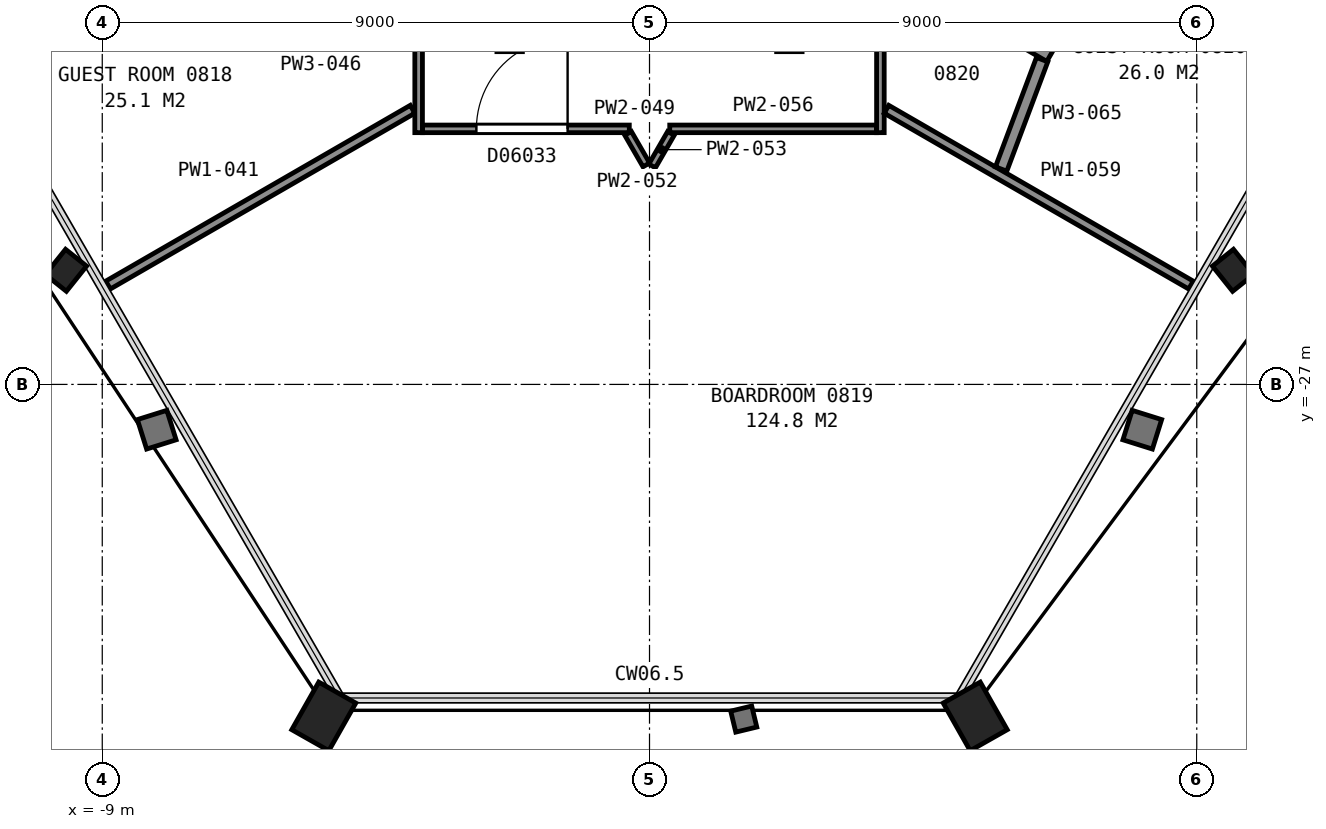
"""IFC4 building model, lengths in metres.
Left out: names, types, materials, properties, quantities, classifications, styles, units other than length and angle.
Written with IfcOpenShell. Run it as: python <this file> out.ifc"""

import sys

from ifc_helpers import new_model, si_unit, direction, frame, frame_2d, origin, origin_2d, place, context, subcontext, project, spatial, rectangle, hollow_rectangle, i_section, extrude, element, fill, save


model = new_model("IFC4")
c1 = context("Model", 3, precision=1e-05, world=origin(), true_north=direction((0.0, 1.0)))
c2 = subcontext(c1, "Body", "Model", "MODEL_VIEW")
j1 = project(units=[si_unit("LENGTHUNIT", "METRE"), si_unit("PLANEANGLEUNIT", "RADIAN")], contexts=[c1])
p1 = place(None, origin())
s1 = spatial("IfcSite", under=j1, at=p1, CompositionType="ELEMENT")
p2 = place(p1, origin())
s2 = spatial("IfcBuilding", under=s1, at=p2, CompositionType="ELEMENT")
p3 = place(p2, frame((0.0, 0.0, 44.0)))
s3 = spatial("IfcBuildingStorey", under=s2, at=p3, CompositionType="ELEMENT", Elevation=44.0)
p4 = place(p3, frame((-9.531, -25.042, 0.025), z_axis=(-0.055280193141, -0.0691858675, 0.99607098943), x_axis=(-0.500260579817, 0.865270863032, 0.032337066484)))
e1 = element("IfcColumn", 1, at=p4, inside=s3, PredefinedType="COLUMN", context=c2, shape_type="SweptSolid", body=[
    extrude(i_section(OverallWidth=0.442, OverallDepth=0.531, WebThickness=0.066, FlangeThickness=0.106, FilletRadius=0.015, at=origin_2d()), origin(), (0.0, 0.0, 1.0), 3.564),
])
for number, where, z_axis, x_axis in (
    (2, (-5.302, -32.363, 0.04), (-0.047, -0.083, 0.995), (-0.999, -0.001, -0.047)),
    (3, (5.302, -32.363, 0.04), (0.047, -0.083, 0.995), (-0.999, 0.001, 0.047)),
):
    element("IfcColumn", number, at=place(p3, frame(where, z_axis=z_axis, x_axis=x_axis)), inside=s3, PredefinedType="COLUMN", context=c2, shape_type="SweptSolid", body=[
        extrude(hollow_rectangle(XDim=0.7, YDim=0.9, WallThickness=0.065, at=origin_2d()), origin(), (0.0, 0.0, 1.0), 3.536),
    ])
p5 = place(p3, frame((9.531, -25.042, 0.025), z_axis=(0.055280193141, -0.0691858675, 0.99607098943), x_axis=(-0.500260579817, -0.865270863032, -0.032337066484)))
e4 = element("IfcColumn", 4, at=p5, inside=s3, PredefinedType="COLUMN", context=c2, shape_type="SweptSolid", body=[
    extrude(i_section(OverallWidth=0.442, OverallDepth=0.531, WebThickness=0.066, FlangeThickness=0.106, FilletRadius=0.015, at=origin_2d()), origin(), (0.0, 0.0, 1.0), 3.564),
])
p6 = place(p3, frame((-8.905, -25.366, 0.0), z_axis=(0.0, 0.0, 1.0), x_axis=(0.866025977343, 0.499999006567, 0.0)))
e5 = element("IfcWall", 5, at=p6, inside=s3, PredefinedType="PARTITIONING", context=c2, shape_type="SweptSolid", body=[
    extrude(rectangle(XDim=5.782, YDim=0.15, at=frame_2d((2.891, 0.0))), origin(), (0.0, 0.0, 1.0), 2.613),
])
p7 = place(p3, frame((-3.797, -22.86, 0.0), z_axis=(0.0, 0.0, 1.0), x_axis=(0.0, 1.0, 0.0)))
e6 = element("IfcWall", 6, at=p7, inside=s3, PredefinedType="PARTITIONING", context=c2, shape_type="SweptSolid", body=[
    extrude(rectangle(XDim=5.871, YDim=0.125, at=frame_2d((2.935, 0.0))), origin(), (0.0, 0.0, 1.0), 2.613),
])
p8 = place(p7, frame((1.442, 0.0, 0.0)))
e7 = element("IfcOpeningElement", 7, at=p8, cuts=e6, PredefinedType="OPENING", context=c2, shape_type="SweptSolid", body=[
    extrude(rectangle(XDim=0.9, YDim=2.1, at=frame_2d((0.45, 1.05))), frame((0.0, 0.073, 0.0), z_axis=(0.0, -1.0, 0.0), x_axis=(1.0, 0.0, 0.0)), (0.0, 0.0, 1.0), 0.145),
])
p9 = place(p3, frame((-0.333, -22.797, 0.0), z_axis=(0.0, 0.0, 1.0), x_axis=(-1.0, 0.0, 0.0)))
e8 = element("IfcWall", 8, at=p9, inside=s3, PredefinedType="PARTITIONING", context=c2, shape_type="SweptSolid", body=[
    extrude(rectangle(XDim=3.399, YDim=0.125, at=frame_2d((1.7, 0.0))), origin(), (0.0, 0.0, 1.0), 2.613),
])
p10 = place(p9, frame((1.014, 0.0, 0.0)))
e9 = element("IfcOpeningElement", 9, at=p10, cuts=e8, PredefinedType="OPENING", context=c2, shape_type="SweptSolid", body=[
    extrude(rectangle(XDim=1.5, YDim=2.1, at=frame_2d((0.75, 1.05))), frame((0.0, 0.073, 0.0), z_axis=(0.0, -1.0, 0.0), x_axis=(1.0, 0.0, 0.0)), (0.0, 0.0, 1.0), 0.145),
])
p11 = place(p3, frame((-0.353, -22.871, 0.0), z_axis=(0.0, 0.0, 1.0), x_axis=(0.499863517517, -0.866104187645, 0.0)))
e10 = element("IfcWall", 10, at=p11, inside=s3, PredefinedType="PARTITIONING", context=c2, shape_type="SweptSolid", body=[
    extrude(rectangle(XDim=0.599, YDim=0.125, at=frame_2d((0.3, 0.0))), origin(), (0.0, 0.0, 1.0), 2.613),
])
p12 = place(p3, frame((0.043, -23.407, 0.0), z_axis=(0.0, 0.0, 1.0), x_axis=(0.499870333213, 0.866100253997, 0.0)))
e11 = element("IfcWall", 11, at=p12, inside=s3, PredefinedType="PARTITIONING", context=c2, shape_type="SweptSolid", body=[
    extrude(rectangle(XDim=0.619, YDim=0.125, at=frame_2d((0.31, 0.0))), origin(), (0.0, 0.0, 1.0), 2.613),
])
p13 = place(p3, frame((0.333, -22.797, 0.0), z_axis=(0.0, 0.0, 1.0), x_axis=(1.0, 0.0, 0.0)))
e12 = element("IfcWall", 12, at=p13, inside=s3, PredefinedType="PARTITIONING", context=c2, shape_type="SweptSolid", body=[
    extrude(rectangle(XDim=3.399, YDim=0.125, at=frame_2d((1.7, 0.0))), origin(), (0.0, 0.0, 1.0), 2.613),
])
p14 = place(p3, frame((3.797, -16.989, 0.0), z_axis=(0.0, 0.0, 1.0), x_axis=(0.0, -1.0, 0.0)))
e13 = element("IfcWall", 13, at=p14, inside=s3, PredefinedType="PARTITIONING", context=c2, shape_type="SweptSolid", body=[
    extrude(rectangle(XDim=5.871, YDim=0.125, at=frame_2d((2.935, 0.0))), origin(), (0.0, 0.0, 1.0), 2.613),
])
p15 = place(p14, frame((1.103, 0.0, 0.0)))
e14 = element("IfcOpeningElement", 14, at=p15, cuts=e13, PredefinedType="OPENING", context=c2, shape_type="SweptSolid", body=[
    extrude(rectangle(XDim=0.9, YDim=2.1, at=frame_2d((0.45, 1.05))), frame((0.0, 0.073, 0.0), z_axis=(0.0, -1.0, 0.0), x_axis=(1.0, 0.0, 0.0)), (0.0, 0.0, 1.0), 0.145),
])
p16 = place(p3, frame((3.897, -22.475, 0.0), z_axis=(0.0, 0.0, 1.0), x_axis=(0.866025977343, -0.499999006567, 0.0)))
e15 = element("IfcWall", 15, at=p16, inside=s3, PredefinedType="PARTITIONING", context=c2, shape_type="SweptSolid", body=[
    extrude(rectangle(XDim=5.782, YDim=0.15, at=frame_2d((2.891, 0.0))), origin(), (0.0, 0.0, 1.0), 2.613),
])
p17 = place(p3, frame((6.583, -21.601, 0.0), z_axis=(0.0, 0.0, 1.0), x_axis=(-0.865981493415, 0.500076047279, 0.0)))
e16 = element("IfcWall", 16, at=p17, inside=s3, PredefinedType="PARTITIONING", context=c2, shape_type="SweptSolid", body=[
    extrude(rectangle(XDim=3.088, YDim=0.2, at=frame_2d((1.544, 0.0))), origin(), (0.0, 0.0, 1.0), 2.613),
])
p18 = place(p17, frame((1.268, 0.0, 0.0)))
e17 = element("IfcOpeningElement", 17, at=p18, cuts=e16, PredefinedType="OPENING", context=c2, shape_type="SweptSolid", body=[
    extrude(rectangle(XDim=0.8, YDim=2.1, at=frame_2d((0.4, 1.05))), frame((0.0, 0.11, 0.0), z_axis=(0.0, -1.0, 0.0), x_axis=(1.0, 0.0, 0.0)), (0.0, 0.0, 1.0), 0.22),
])
p19 = place(p3, frame((5.782, -23.457, 0.0), z_axis=(0.0, 0.0, 1.0), x_axis=(0.350942351116, 0.936397066523, 0.0)))
e18 = element("IfcWall", 18, at=p19, inside=s3, PredefinedType="PARTITIONING", context=c2, shape_type="SweptSolid", body=[
    extrude(rectangle(XDim=1.921, YDim=0.2, at=frame_2d((0.96, 0.0))), origin(), (0.0, 0.0, 1.0), 2.613),
])
p20 = place(p10, origin())
e19 = element("IfcDoor", 19, at=p20, inside=s3, OperationType="DOUBLE_DOOR_SINGLE_SWING", PredefinedType="DOOR", context=c2, shape_type="SweptSolid", body=[
    extrude(rectangle(XDim=1.5, YDim=2.1, at=frame_2d((0.75, 1.05))), frame((0.0, 0.025, 0.0), z_axis=(0.0, -1.0, 0.0), x_axis=(1.0, 0.0, 0.0)), (0.0, 0.0, 1.0), 0.05),
])
fill(e9, e19)
save(model, sys.argv[1])
